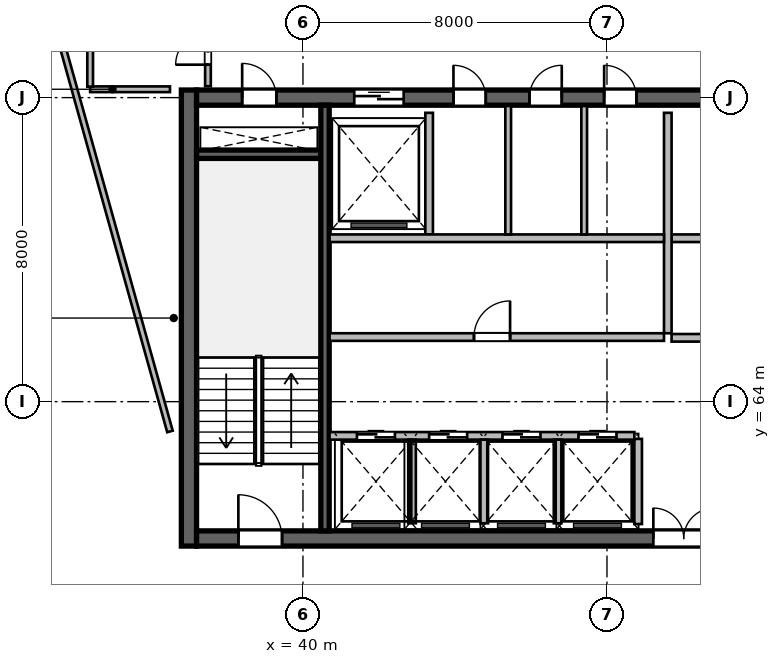
"""IFC4 building model, lengths in metres.
Left out: names, types, materials, properties, quantities, classifications, styles, units other than length and angle.
Written with IfcOpenShell. Run it as: python <this file> out.ifc"""

import sys

from ifc_helpers import new_model, si_unit, direction, frame, frame_2d, origin, place, context, subcontext, project, spatial, rectangle, extrude, source, transform, mapped, element, fill, save


model = new_model("IFC4")
c1 = context("Model", 3, precision=1e-05, world=origin(), true_north=direction((0.0, 1.0)))
c2 = subcontext(c1, "Body", "Model", "MODEL_VIEW")
j1 = project(units=[si_unit("LENGTHUNIT", "METRE"), si_unit("PLANEANGLEUNIT", "RADIAN")], contexts=[c1])
p1 = place(None, origin())
s1 = spatial("IfcSite", under=j1, at=p1, CompositionType="ELEMENT")
p2 = place(p1, origin())
s2 = spatial("IfcBuilding", under=s1, at=p2, CompositionType="ELEMENT")
p3 = place(p2, frame((0.0, 0.0, 275.7)))
s3 = spatial("IfcBuildingStorey", under=s2, at=p3, CompositionType="ELEMENT", Elevation=275.7)
m1 = source(origin(), c2, "Body", "SweptSolid", [
    extrude(rectangle(XDim=12.0, YDim=0.4, at=frame_2d((6.0, 0.0))), origin(), (0.0, 0.0, 1.0), 3.9),
])
p4 = place(p3, frame((37.0, 60.2, 0.0), z_axis=(0.0, 0.0, 1.0), x_axis=(0.0, 1.0, 0.0)))
e1 = element("IfcWall", 1, at=p4, inside=s3, PredefinedType="SHEAR", context=c2, shape_type="MappedRepresentation", body=[
    mapped(m1, transform((0.0, 0.0, 0.0), scale=1.0)),
])
m2 = source(origin(), c2, "Body", "SweptSolid", [
    extrude(rectangle(XDim=21.6, YDim=0.4, at=frame_2d((10.8, 0.0))), origin(), (0.0, 0.0, 1.0), 3.9),
])
p5 = place(p3, frame((37.2, 60.4, 0.0), z_axis=(0.0, 0.0, 1.0), x_axis=(1.0, 0.0, 0.0)))
e2 = element("IfcWall", 2, at=p5, inside=s3, PredefinedType="SHEAR", context=c2, shape_type="MappedRepresentation", body=[
    mapped(m2, transform((0.0, 0.0, 0.0), scale=1.0)),
])
p6 = place(p5, frame((1.1, 0.0, 0.0)))
e3 = element("IfcOpeningElement", 3, at=p6, cuts=e2, PredefinedType="OPENING", context=c2, shape_type="SweptSolid", body=[
    extrude(rectangle(XDim=1.15, YDim=2.15, at=frame_2d((0.575, 1.075))), frame((0.0, 0.21, 0.0), z_axis=(0.0, -1.0, 0.0), x_axis=(1.0, 0.0, 0.0)), (0.0, 0.0, 1.0), 0.42),
])
p7 = place(p5, frame((19.5, 0.0, 0.0)))
e4 = element("IfcOpeningElement", 4, at=p7, cuts=e2, PredefinedType="OPENING", context=c2, shape_type="SweptSolid", body=[
    extrude(rectangle(XDim=0.9, YDim=2.1, at=frame_2d((0.45, 1.05))), frame((0.0, 0.21, 0.0), z_axis=(0.0, -1.0, 0.0), x_axis=(1.0, 0.0, 0.0)), (0.0, 0.0, 1.0), 0.42),
])
p8 = place(p5, frame((12.02, 0.0, 0.0)))
e5 = element("IfcOpeningElement", 5, at=p8, cuts=e2, PredefinedType="OPENING", context=c2, shape_type="SweptSolid", body=[
    extrude(rectangle(XDim=1.6, YDim=2.15, at=frame_2d((0.8, 1.075))), frame((0.0, 0.21, 0.0), z_axis=(0.0, -1.0, 0.0), x_axis=(1.0, 0.0, 0.0)), (0.0, 0.0, 1.0), 0.42),
])
p9 = place(p3, frame((37.2, 72.0, 0.0), z_axis=(0.0, 0.0, 1.0), x_axis=(1.0, 0.0, 0.0)))
e6 = element("IfcWall", 6, at=p9, inside=s3, PredefinedType="SHEAR", context=c2, shape_type="MappedRepresentation", body=[
    mapped(m2, transform((0.0, 0.0, 0.0), scale=1.0)),
])
p10 = place(p9, frame((1.2, 0.0, 0.0)))
e7 = element("IfcOpeningElement", 7, at=p10, cuts=e6, PredefinedType="OPENING", context=c2, shape_type="SweptSolid", body=[
    extrude(rectangle(XDim=0.9, YDim=2.1, at=frame_2d((0.45, 1.05))), frame((0.0, 0.21, 0.0), z_axis=(0.0, -1.0, 0.0), x_axis=(1.0, 0.0, 0.0)), (0.0, 0.0, 1.0), 0.42),
])
p11 = place(p9, frame((14.7, 0.0, 0.0)))
e8 = element("IfcOpeningElement", 8, at=p11, cuts=e6, PredefinedType="OPENING", context=c2, shape_type="SweptSolid", body=[
    extrude(rectangle(XDim=1.2, YDim=2.15, at=frame_2d((0.6, 1.075))), frame((0.0, 0.21, 0.0), z_axis=(0.0, -1.0, 0.0), x_axis=(1.0, 0.0, 0.0)), (0.0, 0.0, 1.0), 0.42),
])
p12 = place(p9, frame((4.15, 0.0, 0.0)))
e9 = element("IfcOpeningElement", 9, at=p12, cuts=e6, PredefinedType="OPENING", context=c2, shape_type="SweptSolid", body=[
    extrude(rectangle(XDim=1.3, YDim=2.15, at=frame_2d((0.65, 1.075))), frame((0.0, 0.21, 0.0), z_axis=(0.0, -1.0, 0.0), x_axis=(1.0, 0.0, 0.0)), (0.0, 0.0, 1.0), 0.42),
])
p13 = place(p9, frame((6.76, 0.0, 0.0)))
e10 = element("IfcOpeningElement", 10, at=p13, cuts=e6, PredefinedType="OPENING", context=c2, shape_type="SweptSolid", body=[
    extrude(rectangle(XDim=0.85, YDim=2.1, at=frame_2d((0.425, 1.05))), frame((0.0, 0.21, 0.0), z_axis=(0.0, -1.0, 0.0), x_axis=(1.0, 0.0, 0.0)), (0.0, 0.0, 1.0), 0.42),
])
p14 = place(p9, frame((8.76, 0.0, 0.0)))
e11 = element("IfcOpeningElement", 11, at=p14, cuts=e6, PredefinedType="OPENING", context=c2, shape_type="SweptSolid", body=[
    extrude(rectangle(XDim=0.85, YDim=2.1, at=frame_2d((0.425, 1.05))), frame((0.0, 0.21, 0.0), z_axis=(0.0, -1.0, 0.0), x_axis=(1.0, 0.0, 0.0)), (0.0, 0.0, 1.0), 0.42),
])
p15 = place(p9, frame((10.725, 0.0, 0.0)))
e12 = element("IfcOpeningElement", 12, at=p15, cuts=e6, PredefinedType="OPENING", context=c2, shape_type="SweptSolid", body=[
    extrude(rectangle(XDim=0.85, YDim=2.1, at=frame_2d((0.425, 1.05))), frame((0.0, 0.21, 0.0), z_axis=(0.0, -1.0, 0.0), x_axis=(1.0, 0.0, 0.0)), (0.0, 0.0, 1.0), 0.42),
])
m3 = source(origin(), c2, "Body", "SweptSolid", [
    extrude(rectangle(XDim=3.27, YDim=0.22, at=frame_2d((1.635, 0.0))), origin(), (0.0, 0.0, 1.0), 3.9),
])
p16 = place(p3, frame((37.2, 70.51, 0.0), z_axis=(0.0, 0.0, 1.0), x_axis=(1.0, 0.0, 0.0)))
e13 = element("IfcWall", 13, at=p16, inside=s3, PredefinedType="SHEAR", context=c2, shape_type="MappedRepresentation", body=[
    mapped(m3, transform((0.0, 0.0, 0.0), scale=1.0)),
])
m4 = source(origin(), c2, "Body", "SweptSolid", [
    extrude(rectangle(XDim=11.2, YDim=0.22, at=frame_2d((5.6, 0.0))), origin(), (0.0, 0.0, 1.0), 3.9),
])
p17 = place(p3, frame((40.58, 60.6, 0.0), z_axis=(0.0, 0.0, 1.0), x_axis=(0.0, 1.0, 0.0)))
e14 = element("IfcWall", 14, at=p17, inside=s3, PredefinedType="SHEAR", context=c2, shape_type="MappedRepresentation", body=[
    mapped(m4, transform((0.0, 0.0, 0.0), scale=1.0)),
])
m5 = source(origin(), c2, "Body", "SweptSolid", [
    extrude(rectangle(XDim=2.24, YDim=0.2, at=frame_2d((1.12, 0.0))), origin(), (0.0, 0.0, 1.0), 3.64),
])
p18 = place(p3, frame((48.82, 60.78, 0.0), z_axis=(0.0, 0.0, 1.0), x_axis=(0.0, 1.0, 0.0)))
e15 = element("IfcWall", 15, at=p18, inside=s3, PredefinedType="SOLIDWALL", context=c2, shape_type="MappedRepresentation", body=[
    mapped(m5, transform((0.0, 0.0, 0.0), scale=1.0)),
])
m6 = source(origin(), c2, "Body", "SweptSolid", [
    extrude(rectangle(XDim=5.62, YDim=0.2, at=frame_2d((2.81, 0.0))), origin(), (0.0, 0.0, 1.0), 3.64),
])
p19 = place(p3, frame((49.7, 68.3, 0.0), z_axis=(0.0, 0.0, 1.0), x_axis=(1.0, 0.0, 0.0)))
e16 = element("IfcWall", 16, at=p19, inside=s3, PredefinedType="SOLIDWALL", context=c2, shape_type="MappedRepresentation", body=[
    mapped(m6, transform((0.0, 0.0, 0.0), scale=1.0)),
])
p20 = place(p19, frame((1.6, 0.0, 0.0)))
e17 = element("IfcOpeningElement", 17, at=p20, cuts=e16, PredefinedType="OPENING", context=c2, shape_type="SweptSolid", body=[
    extrude(rectangle(XDim=1.1, YDim=2.15, at=frame_2d((0.55, 1.075))), frame((0.0, 0.11, 0.0), z_axis=(0.0, -1.0, 0.0), x_axis=(1.0, 0.0, 0.0)), (0.0, 0.0, 1.0), 0.22),
])
p21 = place(p19, frame((3.7, 0.0, 0.0)))
e18 = element("IfcOpeningElement", 18, at=p21, cuts=e16, PredefinedType="OPENING", context=c2, shape_type="SweptSolid", body=[
    extrude(rectangle(XDim=1.1, YDim=2.15, at=frame_2d((0.55, 1.075))), frame((0.0, 0.11, 0.0), z_axis=(0.0, -1.0, 0.0), x_axis=(1.0, 0.0, 0.0)), (0.0, 0.0, 1.0), 0.22),
])
m7 = source(origin(), c2, "Body", "SweptSolid", [
    extrude(rectangle(XDim=5.8, YDim=0.2, at=frame_2d((2.9, 0.0))), origin(), (0.0, 0.0, 1.0), 3.64),
])
p22 = place(p3, frame((49.6, 65.8, 0.0), z_axis=(0.0, 0.0, 1.0), x_axis=(0.0, 1.0, 0.0)))
e19 = element("IfcWall", 19, at=p22, inside=s3, PredefinedType="SOLIDWALL", context=c2, shape_type="MappedRepresentation", body=[
    mapped(m7, transform((0.0, 0.0, 0.0), scale=1.0)),
])
p23 = place(p3, frame((49.7, 65.68, 0.0), z_axis=(0.0, 0.0, 1.0), x_axis=(1.0, 0.0, 0.0)))
e20 = element("IfcWall", 20, at=p23, inside=s3, PredefinedType="SOLIDWALL", context=c2, shape_type="MappedRepresentation", body=[
    mapped(m6, transform((0.0, 0.0, 0.0), scale=1.0)),
])
m8 = source(origin(), c2, "Body", "SweptSolid", [
    extrude(rectangle(XDim=3.2, YDim=0.2, at=frame_2d((1.6, 0.0))), origin(), (0.0, 0.0, 1.0), 3.64),
])
p24 = place(p3, frame((43.32, 68.4, 0.0), z_axis=(0.0, 0.0, 1.0), x_axis=(0.0, 1.0, 0.0)))
e21 = element("IfcWall", 21, at=p24, inside=s3, PredefinedType="SOLIDWALL", context=c2, shape_type="MappedRepresentation", body=[
    mapped(m8, transform((0.0, 0.0, 0.0), scale=1.0)),
])
m9 = source(origin(), c2, "Body", "SweptSolid", [
    extrude(rectangle(XDim=8.8, YDim=0.2, at=frame_2d((4.4, 0.0))), origin(), (0.0, 0.0, 1.0), 3.64),
])
p25 = place(p3, frame((40.7, 68.3, 0.0), z_axis=(0.0, 0.0, 1.0), x_axis=(1.0, 0.0, 0.0)))
e22 = element("IfcWall", 22, at=p25, inside=s3, PredefinedType="SOLIDWALL", context=c2, shape_type="MappedRepresentation", body=[
    mapped(m9, transform((0.0, 0.0, 0.0), scale=1.0)),
])
m10 = source(origin(), c2, "Body", "SweptSolid", [
    extrude(rectangle(XDim=3.38, YDim=0.15, at=frame_2d((1.69, 0.0))), origin(), (0.0, 0.0, 1.0), 3.64),
])
for number, where, z_axis, x_axis in (
    (23, (45.4, 68.4, 0.0), (0.0, 0.0, 1.0), (0.0, 1.0, 0.0)),
    (24, (47.4, 68.4, 0.0), (0.0, 0.0, 1.0), (0.0, 1.0, 0.0)),
):
    element("IfcWall", number, at=place(p3, frame(where, z_axis=z_axis, x_axis=x_axis)), inside=s3, PredefinedType="PARTITIONING", context=c2, shape_type="MappedRepresentation", body=[
        mapped(m10, transform((0.0, 0.0, 0.0), scale=1.0)),
    ])
m11 = source(origin(), c2, "Body", "SweptSolid", [
    extrude(rectangle(XDim=8.02, YDim=0.2, at=frame_2d((4.01, 0.0))), origin(), (0.0, 0.0, 1.0), 3.64),
])
p26 = place(p3, frame((40.7, 63.1, 0.0), z_axis=(0.0, 0.0, 1.0), x_axis=(1.0, 0.0, 0.0)))
e25 = element("IfcWall", 25, at=p26, inside=s3, PredefinedType="SOLIDWALL", context=c2, shape_type="MappedRepresentation", body=[
    mapped(m11, transform((0.0, 0.0, 0.0), scale=1.0)),
])
p27 = place(p26, frame((0.72, 0.0, 0.0)))
e26 = element("IfcOpeningElement", 26, at=p27, cuts=e25, PredefinedType="OPENING", context=c2, shape_type="SweptSolid", body=[
    extrude(rectangle(XDim=1.0, YDim=2.15, at=frame_2d((0.5, 1.075))), frame((0.0, 0.11, 0.0), z_axis=(0.0, -1.0, 0.0), x_axis=(1.0, 0.0, 0.0)), (0.0, 0.0, 1.0), 0.22),
])
p28 = place(p26, frame((2.62, 0.0, 0.0)))
e27 = element("IfcOpeningElement", 27, at=p28, cuts=e25, PredefinedType="OPENING", context=c2, shape_type="SweptSolid", body=[
    extrude(rectangle(XDim=1.0, YDim=2.15, at=frame_2d((0.5, 1.075))), frame((0.0, 0.11, 0.0), z_axis=(0.0, -1.0, 0.0), x_axis=(1.0, 0.0, 0.0)), (0.0, 0.0, 1.0), 0.22),
])
p29 = place(p26, frame((4.55, 0.0, 0.0)))
e28 = element("IfcOpeningElement", 28, at=p29, cuts=e25, PredefinedType="OPENING", context=c2, shape_type="SweptSolid", body=[
    extrude(rectangle(XDim=1.0, YDim=2.15, at=frame_2d((0.5, 1.075))), frame((0.0, 0.11, 0.0), z_axis=(0.0, -1.0, 0.0), x_axis=(1.0, 0.0, 0.0)), (0.0, 0.0, 1.0), 0.22),
])
p30 = place(p26, frame((6.55, 0.0, 0.0)))
e29 = element("IfcOpeningElement", 29, at=p30, cuts=e25, PredefinedType="OPENING", context=c2, shape_type="SweptSolid", body=[
    extrude(rectangle(XDim=1.0, YDim=2.15, at=frame_2d((0.5, 1.075))), frame((0.0, 0.11, 0.0), z_axis=(0.0, -1.0, 0.0), x_axis=(1.0, 0.0, 0.0)), (0.0, 0.0, 1.0), 0.22),
])
m12 = source(origin(), c2, "Body", "SweptSolid", [
    extrude(rectangle(XDim=2.2, YDim=0.2, at=frame_2d((1.1, 0.0))), origin(), (0.0, 0.0, 1.0), 3.64),
])
for number, where, z_axis, x_axis in (
    (30, (42.87, 60.8, 0.0), (0.0, 0.0, 1.0), (0.0, 1.0, 0.0)),
    (31, (44.77, 60.8, 0.0), (0.0, 0.0, 1.0), (0.0, 1.0, 0.0)),
    (32, (46.7, 60.8, 0.0), (0.0, 0.0, 1.0), (0.0, 1.0, 0.0)),
):
    element("IfcWall", number, at=place(p3, frame(where, z_axis=z_axis, x_axis=x_axis)), inside=s3, PredefinedType="SOLIDWALL", context=c2, shape_type="MappedRepresentation", body=[
        mapped(m12, transform((0.0, 0.0, 0.0), scale=1.0)),
    ])
p31 = place(p3, frame((40.7, 65.7, 0.0), z_axis=(0.0, 0.0, 1.0), x_axis=(1.0, 0.0, 0.0)))
e33 = element("IfcWall", 33, at=p31, inside=s3, PredefinedType="SOLIDWALL", context=c2, shape_type="MappedRepresentation", body=[
    mapped(m9, transform((0.0, 0.0, 0.0), scale=1.0)),
])
p32 = place(p31, frame((3.8, 0.0, 0.0)))
e34 = element("IfcOpeningElement", 34, at=p32, cuts=e33, PredefinedType="OPENING", context=c2, shape_type="SweptSolid", body=[
    extrude(rectangle(XDim=0.95, YDim=2.15, at=frame_2d((0.475, 1.075))), frame((0.0, 0.11, 0.0), z_axis=(0.0, -1.0, 0.0), x_axis=(1.0, 0.0, 0.0)), (0.0, 0.0, 1.0), 0.22),
])
m13 = source(origin(), c2, "Body", "SweptSolid", [
    extrude(rectangle(XDim=2.1, YDim=0.15, at=frame_2d((1.05, 0.0))), origin(), (0.0, 0.0, 1.0), 3.64),
])
p33 = place(p3, frame((34.4, 72.22, 0.0), z_axis=(0.0, 0.0, 1.0), x_axis=(1.0, 0.0, 0.0)))
e35 = element("IfcWall", 35, at=p33, inside=s3, PredefinedType="PARTITIONING", context=c2, shape_type="MappedRepresentation", body=[
    mapped(m13, transform((0.0, 0.0, 0.0), scale=1.0)),
])
m14 = source(origin(), c2, "Body", "SweptSolid", [
    extrude(rectangle(XDim=1.995, YDim=0.15, at=frame_2d((0.998, 0.0))), origin(), (0.0, 0.0, 1.0), 3.64),
])
p34 = place(p3, frame((34.4, 72.288, 0.0), z_axis=(0.0, 0.0, 1.0), x_axis=(0.0, 1.0, 0.0)))
e36 = element("IfcWall", 36, at=p34, inside=s3, PredefinedType="PARTITIONING", context=c2, shape_type="MappedRepresentation", body=[
    mapped(m14, transform((0.0, 0.0, 0.0), scale=1.0)),
])
m15 = source(origin(), c2, "Body", "SweptSolid", [
    extrude(rectangle(XDim=1.982, YDim=0.15, at=frame_2d((0.991, 0.0))), origin(), (0.0, 0.0, 1.0), 3.64),
])
p35 = place(p3, frame((37.5, 72.3, 0.0), z_axis=(0.0, 0.0, 1.0), x_axis=(0.0, 1.0, 0.0)))
e37 = element("IfcWall", 37, at=p35, inside=s3, PredefinedType="PARTITIONING", context=c2, shape_type="MappedRepresentation", body=[
    mapped(m15, transform((0.0, 0.0, 0.0), scale=1.0)),
])
p36 = place(p35, frame((0.566, 0.0, 0.0)))
e38 = element("IfcOpeningElement", 38, at=p36, cuts=e37, PredefinedType="OPENING", context=c2, shape_type="SweptSolid", body=[
    extrude(rectangle(XDim=0.85, YDim=2.1, at=frame_2d((0.425, 1.05))), frame((0.0, 0.085, 0.0), z_axis=(0.0, -1.0, 0.0), x_axis=(1.0, 0.0, 0.0)), (0.0, 0.0, 1.0), 0.17),
])
m16 = source(origin(), c2, "Body", "SweptSolid", [
    extrude(rectangle(XDim=17.556, YDim=0.15, at=frame_2d((8.778, 0.0))), origin(), (0.0, 0.0, 1.0), 3.64),
])
p37 = place(p3, frame((33.8, 54.958, 0.0), z_axis=(0.0, 0.0, 1.0), x_axis=(-0.395687598313, 0.918385172213, 0.0)))
e39 = element("IfcWall", 39, at=p37, inside=s3, PredefinedType="PARTITIONING", context=c2, shape_type="MappedRepresentation", body=[
    mapped(m16, transform((0.0, 0.0, 0.0), scale=1.0)),
])
m17 = source(origin(), c2, "Body", "SweptSolid", [
    extrude(rectangle(XDim=12.311, YDim=0.15, at=frame_2d((6.155, 0.0))), origin(), (0.0, 0.0, 1.0), 3.64),
])
p38 = place(p3, frame((36.5, 63.216, 0.0), z_axis=(0.0, 0.0, 1.0), x_axis=(-0.268759602651, 0.963207286093, 0.0)))
e40 = element("IfcWall", 40, at=p38, inside=s3, PredefinedType="PARTITIONING", context=c2, shape_type="MappedRepresentation", body=[
    mapped(m17, transform((0.0, 0.0, 0.0), scale=1.0)),
])
m18 = source(origin(), c2, "Body", "SweptSolid", [
    extrude(rectangle(XDim=1.15, YDim=2.15, at=frame_2d((0.575, 1.075))), frame((0.0, 0.025, 0.0), z_axis=(0.0, -1.0, 0.0), x_axis=(1.0, 0.0, 0.0)), (0.0, 0.0, 1.0), 0.05),
])
p39 = place(p6, origin())
e41 = element("IfcDoor", 41, at=p39, inside=s3, OperationType="SINGLE_SWING_LEFT", PredefinedType="DOOR", context=c2, shape_type="MappedRepresentation", body=[
    mapped(m18, transform((0.0, 0.0, 0.0), scale=1.0)),
])
fill(e3, e41)
m19 = source(origin(), c2, "Body", "SweptSolid", [
    extrude(rectangle(XDim=0.9, YDim=2.1, at=frame_2d((0.45, 1.05))), frame((0.0, 0.025, 0.0), z_axis=(0.0, -1.0, 0.0), x_axis=(1.0, 0.0, 0.0)), (0.0, 0.0, 1.0), 0.05),
])
p40 = place(p10, origin())
e42 = element("IfcDoor", 42, at=p40, inside=s3, OperationType="SINGLE_SWING_LEFT", PredefinedType="DOOR", context=c2, shape_type="MappedRepresentation", body=[
    mapped(m19, transform((0.0, 0.0, 0.0), scale=1.0)),
])
fill(e7, e42)
m20 = source(origin(), c2, "Body", "SweptSolid", [
    extrude(rectangle(XDim=1.6, YDim=2.15, at=frame_2d((0.8, 1.075))), frame((0.0, 0.025, 0.0), z_axis=(0.0, -1.0, 0.0), x_axis=(1.0, 0.0, 0.0)), (0.0, 0.0, 1.0), 0.05),
])
p41 = place(p8, origin())
e43 = element("IfcDoor", 43, at=p41, inside=s3, OperationType="DOUBLE_DOOR_SINGLE_SWING", PredefinedType="DOOR", context=c2, shape_type="MappedRepresentation", body=[
    mapped(m20, transform((0.0, 0.0, 0.0), scale=1.0)),
])
fill(e5, e43)
m21 = source(origin(), c2, "Body", "SweptSolid", [
    extrude(rectangle(XDim=1.3, YDim=2.15, at=frame_2d((0.65, 1.075))), frame((0.0, 0.025, 0.0), z_axis=(0.0, -1.0, 0.0), x_axis=(1.0, 0.0, 0.0)), (0.0, 0.0, 1.0), 0.05),
])
p42 = place(p12, origin())
e44 = element("IfcDoor", 44, at=p42, inside=s3, OperationType="DOUBLE_DOOR_SLIDING", PredefinedType="DOOR", context=c2, shape_type="MappedRepresentation", body=[
    mapped(m21, transform((0.0, 0.0, 0.0), scale=1.0)),
])
fill(e9, e44)
m22 = source(origin(), c2, "Body", "SweptSolid", [
    extrude(rectangle(XDim=0.85, YDim=2.1, at=frame_2d((0.425, 1.05))), frame((0.0, 0.025, 0.0), z_axis=(0.0, -1.0, 0.0), x_axis=(1.0, 0.0, 0.0)), (0.0, 0.0, 1.0), 0.05),
])
p43 = place(p13, origin())
e45 = element("IfcDoor", 45, at=p43, inside=s3, OperationType="SINGLE_SWING_LEFT", PredefinedType="DOOR", context=c2, shape_type="MappedRepresentation", body=[
    mapped(m22, transform((0.0, 0.0, 0.0), scale=1.0)),
])
fill(e10, e45)
p44 = place(p14, origin())
e46 = element("IfcDoor", 46, at=p44, inside=s3, OperationType="SINGLE_SWING_RIGHT", PredefinedType="DOOR", context=c2, shape_type="MappedRepresentation", body=[
    mapped(m22, transform((0.0, 0.0, 0.0), scale=1.0)),
])
fill(e11, e46)
p45 = place(p15, origin())
e47 = element("IfcDoor", 47, at=p45, inside=s3, OperationType="SINGLE_SWING_LEFT", PredefinedType="DOOR", context=c2, shape_type="MappedRepresentation", body=[
    mapped(m22, transform((0.0, 0.0, 0.0), scale=1.0)),
])
fill(e12, e47)
m23 = source(origin(), c2, "Body", "SweptSolid", [
    extrude(rectangle(XDim=1.0, YDim=2.15, at=frame_2d((0.5, 1.075))), frame((0.0, 0.025, 0.0), z_axis=(0.0, -1.0, 0.0), x_axis=(1.0, 0.0, 0.0)), (0.0, 0.0, 1.0), 0.05),
])
p46 = place(p27, origin())
e48 = element("IfcDoor", 48, at=p46, inside=s3, OperationType="DOUBLE_DOOR_SLIDING", PredefinedType="DOOR", context=c2, shape_type="MappedRepresentation", body=[
    mapped(m23, transform((0.0, 0.0, 0.0), scale=1.0)),
])
fill(e26, e48)
p47 = place(p28, origin())
e49 = element("IfcDoor", 49, at=p47, inside=s3, OperationType="DOUBLE_DOOR_SLIDING", PredefinedType="DOOR", context=c2, shape_type="MappedRepresentation", body=[
    mapped(m23, transform((0.0, 0.0, 0.0), scale=1.0)),
])
fill(e27, e49)
p48 = place(p29, origin())
e50 = element("IfcDoor", 50, at=p48, inside=s3, OperationType="DOUBLE_DOOR_SLIDING", PredefinedType="DOOR", context=c2, shape_type="MappedRepresentation", body=[
    mapped(m23, transform((0.0, 0.0, 0.0), scale=1.0)),
])
fill(e28, e50)
p49 = place(p30, origin())
e51 = element("IfcDoor", 51, at=p49, inside=s3, OperationType="DOUBLE_DOOR_SLIDING", PredefinedType="DOOR", context=c2, shape_type="MappedRepresentation", body=[
    mapped(m23, transform((0.0, 0.0, 0.0), scale=1.0)),
])
fill(e29, e51)
m24 = source(origin(), c2, "Body", "SweptSolid", [
    extrude(rectangle(XDim=0.95, YDim=2.15, at=frame_2d((0.475, 1.075))), frame((0.0, 0.025, 0.0), z_axis=(0.0, -1.0, 0.0), x_axis=(1.0, 0.0, 0.0)), (0.0, 0.0, 1.0), 0.05),
])
p50 = place(p32, origin())
e52 = element("IfcDoor", 52, at=p50, inside=s3, OperationType="SINGLE_SWING_RIGHT", PredefinedType="DOOR", context=c2, shape_type="MappedRepresentation", body=[
    mapped(m24, transform((0.0, 0.0, 0.0), scale=1.0)),
])
fill(e34, e52)
p51 = place(p36, origin())
e53 = element("IfcDoor", 53, at=p51, inside=s3, OperationType="SINGLE_SWING_LEFT", PredefinedType="DOOR", context=c2, shape_type="MappedRepresentation", body=[
    mapped(m22, transform((0.0, 0.0, 0.0), scale=1.0)),
])
fill(e38, e53)
save(model, sys.argv[1])
